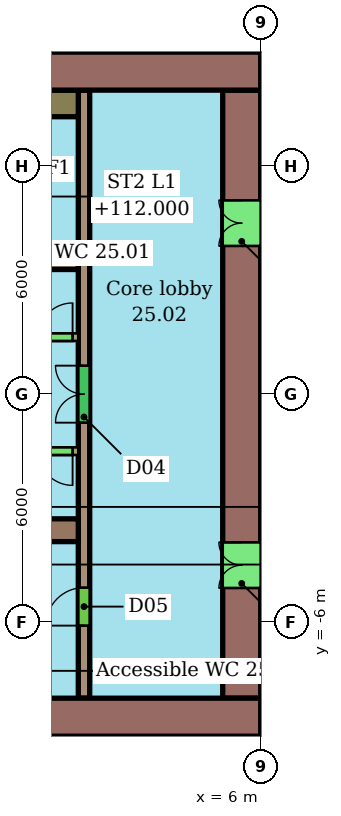
"""IFC4 building model, lengths in metres.
Left out: names, types, materials, properties, quantities, classifications, styles, units other than length and angle.
Written with IfcOpenShell. Run it as: python <this file> out.ifc"""

import sys

from ifc_helpers import new_model, si_unit, direction, frame, frame_2d, origin, place, context, subcontext, project, spatial, rectangle, extrude, element, fill, save


model = new_model("IFC4")
c1 = context("Model", 3, precision=1e-05, world=origin(), true_north=direction((0.0, 1.0)))
c2 = subcontext(c1, "Body", "Model", "MODEL_VIEW")
j1 = project(units=[si_unit("LENGTHUNIT", "METRE"), si_unit("PLANEANGLEUNIT", "RADIAN")], contexts=[c1])
p1 = place(None, origin())
s1 = spatial("IfcSite", under=j1, at=p1, CompositionType="ELEMENT")
p2 = place(p1, origin())
s2 = spatial("IfcBuilding", under=s1, at=p2, CompositionType="ELEMENT")
p3 = place(p2, frame((0.0, 0.0, 110.2)))
s3 = spatial("IfcBuildingStorey", under=s2, at=p3, CompositionType="ELEMENT", Elevation=110.2)
p4 = place(p3, frame((6.0, 8.5, 0.0), z_axis=(0.0, 0.0, 1.0), x_axis=(-1.0, 0.0, 0.0)))
e1 = element("IfcWall", 1, at=p4, inside=s3, PredefinedType="SHEAR", context=c2, shape_type="SweptSolid", body=[
    extrude(rectangle(XDim=12.0, YDim=1.0, at=frame_2d((6.0, 0.0))), origin(), (0.0, 0.0, 1.0), 3.3),
])
p5 = place(p4, frame((5.6, 0.0, 0.0)))
e2 = element("IfcOpeningElement", 2, at=p5, cuts=e1, PredefinedType="OPENING", context=c2, shape_type="SweptSolid", body=[
    extrude(rectangle(XDim=1.2, YDim=2.1, at=frame_2d((0.6, 1.05))), frame((0.0, 0.51, 0.0), z_axis=(0.0, -1.0, 0.0), x_axis=(1.0, 0.0, 0.0)), (0.0, 0.0, 1.0), 1.02),
])
p6 = place(p3, frame((-18.0, -8.5, 0.0), z_axis=(0.0, 0.0, 1.0), x_axis=(1.0, 0.0, 0.0)))
e3 = element("IfcWall", 3, at=p6, inside=s3, PredefinedType="SHEAR", context=c2, shape_type="SweptSolid", body=[
    extrude(rectangle(XDim=24.0, YDim=1.0, at=frame_2d((12.0, 0.0))), origin(), (0.0, 0.0, 1.0), 3.3),
])
p7 = place(p6, frame((6.0, 0.0, 0.0)))
e4 = element("IfcOpeningElement", 4, at=p7, cuts=e3, PredefinedType="OPENING", context=c2, shape_type="SweptSolid", body=[
    extrude(rectangle(XDim=1.2, YDim=2.1, at=frame_2d((0.6, 1.05))), frame((0.0, 0.51, 0.0), z_axis=(0.0, -1.0, 0.0), x_axis=(1.0, 0.0, 0.0)), (0.0, 0.0, 1.0), 1.02),
])
p8 = place(p3, frame((5.5, -8.0, 0.0), z_axis=(0.0, 0.0, 1.0), x_axis=(0.0, 1.0, 0.0)))
e5 = element("IfcWall", 5, at=p8, inside=s3, PredefinedType="SHEAR", context=c2, shape_type="SweptSolid", body=[
    extrude(rectangle(XDim=16.0, YDim=1.0, at=frame_2d((8.0, 0.0))), origin(), (0.0, 0.0, 1.0), 3.3),
])
p9 = place(p8, frame((2.9, 0.0, 0.0)))
e6 = element("IfcOpeningElement", 6, at=p9, cuts=e5, PredefinedType="OPENING", context=c2, shape_type="SweptSolid", body=[
    extrude(rectangle(XDim=1.2, YDim=2.1, at=frame_2d((0.6, 1.05))), frame((0.0, 0.51, 0.0), z_axis=(0.0, -1.0, 0.0), x_axis=(1.0, 0.0, 0.0)), (0.0, 0.0, 1.0), 1.02),
])
p10 = place(p8, frame((11.9, 0.0, 0.0)))
e7 = element("IfcOpeningElement", 7, at=p10, cuts=e5, PredefinedType="OPENING", context=c2, shape_type="SweptSolid", body=[
    extrude(rectangle(XDim=1.2, YDim=2.1, at=frame_2d((0.6, 1.05))), frame((0.0, 0.51, 0.0), z_axis=(0.0, -1.0, 0.0), x_axis=(1.0, 0.0, 0.0)), (0.0, 0.0, 1.0), 1.02),
])
for number, where, z_axis, x_axis in (
    (8, (-6.0, 3.58, 0.0), (0.0, 0.0, 1.0), (1.0, 0.0, 0.0)),
    (9, (-6.0, -3.58, 0.0), (0.0, 0.0, 1.0), (1.0, 0.0, 0.0)),
):
    element("IfcWall", number, at=place(p3, frame(where, z_axis=z_axis, x_axis=x_axis)), inside=s3, PredefinedType="SHEAR", context=c2, shape_type="SweptSolid", body=[
        extrude(rectangle(XDim=7.2, YDim=0.6, at=frame_2d((3.6, 0.0))), origin(), (0.0, 0.0, 1.0), 3.3),
    ])
p11 = place(p3, frame((1.35, -8.0, 0.0), z_axis=(0.0, 0.0, 1.0), x_axis=(0.0, 1.0, 0.0)))
e10 = element("IfcWall", 10, at=p11, inside=s3, PredefinedType="SHEAR", context=c2, shape_type="SweptSolid", body=[
    extrude(rectangle(XDim=16.0, YDim=0.3, at=frame_2d((8.0, 0.0))), origin(), (0.0, 0.0, 1.0), 3.3),
])
p12 = place(p11, frame((1.91, 0.0, 0.0)))
e11 = element("IfcOpeningElement", 11, at=p12, cuts=e10, PredefinedType="OPENING", context=c2, shape_type="SweptSolid", body=[
    extrude(rectangle(XDim=1.0, YDim=2.1, at=frame_2d((0.5, 1.05))), frame((0.0, 0.16, 0.0), z_axis=(0.0, -1.0, 0.0), x_axis=(1.0, 0.0, 0.0)), (0.0, 0.0, 1.0), 0.32),
])
p13 = place(p11, frame((7.25, 0.0, 0.0)))
e12 = element("IfcOpeningElement", 12, at=p13, cuts=e10, PredefinedType="OPENING", context=c2, shape_type="SweptSolid", body=[
    extrude(rectangle(XDim=1.5, YDim=2.1, at=frame_2d((0.75, 1.05))), frame((0.0, 0.16, 0.0), z_axis=(0.0, -1.0, 0.0), x_axis=(1.0, 0.0, 0.0)), (0.0, 0.0, 1.0), 0.32),
])
p14 = place(p3, frame((-13.2, 1.5, 0.0), z_axis=(0.0, 0.0, 1.0), x_axis=(1.0, 0.0, 0.0)))
e13 = element("IfcWall", 13, at=p14, inside=s3, PredefinedType="SHEAR", context=c2, shape_type="SweptSolid", body=[
    extrude(rectangle(XDim=14.4, YDim=0.2, at=frame_2d((7.2, 0.0))), origin(), (0.0, 0.0, 1.0), 3.3),
])
p15 = place(p14, frame((0.546, 0.0, 0.0)))
e14 = element("IfcOpeningElement", 14, at=p15, cuts=e13, PredefinedType="OPENING", context=c2, shape_type="SweptSolid", body=[
    extrude(rectangle(XDim=1.1, YDim=2.1, at=frame_2d((0.55, 1.05))), frame((0.0, 0.11, 0.0), z_axis=(0.0, -1.0, 0.0), x_axis=(1.0, 0.0, 0.0)), (0.0, 0.0, 1.0), 0.22),
])
p16 = place(p14, frame((2.988, 0.0, 0.0)))
e15 = element("IfcOpeningElement", 15, at=p16, cuts=e13, PredefinedType="OPENING", context=c2, shape_type="SweptSolid", body=[
    extrude(rectangle(XDim=1.1, YDim=2.1, at=frame_2d((0.55, 1.05))), frame((0.0, 0.11, 0.0), z_axis=(0.0, -1.0, 0.0), x_axis=(1.0, 0.0, 0.0)), (0.0, 0.0, 1.0), 0.22),
])
p17 = place(p14, frame((5.429, 0.0, 0.0)))
e16 = element("IfcOpeningElement", 16, at=p17, cuts=e13, PredefinedType="OPENING", context=c2, shape_type="SweptSolid", body=[
    extrude(rectangle(XDim=1.1, YDim=2.1, at=frame_2d((0.55, 1.05))), frame((0.0, 0.11, 0.0), z_axis=(0.0, -1.0, 0.0), x_axis=(1.0, 0.0, 0.0)), (0.0, 0.0, 1.0), 0.22),
])
p18 = place(p14, frame((7.871, 0.0, 0.0)))
e17 = element("IfcOpeningElement", 17, at=p18, cuts=e13, PredefinedType="OPENING", context=c2, shape_type="SweptSolid", body=[
    extrude(rectangle(XDim=1.1, YDim=2.1, at=frame_2d((0.55, 1.05))), frame((0.0, 0.11, 0.0), z_axis=(0.0, -1.0, 0.0), x_axis=(1.0, 0.0, 0.0)), (0.0, 0.0, 1.0), 0.22),
])
p19 = place(p14, frame((13.35, 0.0, 0.0)))
e18 = element("IfcOpeningElement", 18, at=p19, cuts=e13, PredefinedType="OPENING", context=c2, shape_type="SweptSolid", body=[
    extrude(rectangle(XDim=0.9, YDim=2.1, at=frame_2d((0.45, 1.05))), frame((0.0, 0.11, 0.0), z_axis=(0.0, -1.0, 0.0), x_axis=(1.0, 0.0, 0.0)), (0.0, 0.0, 1.0), 0.22),
])
p20 = place(p3, frame((1.2, -1.5, 0.0), z_axis=(0.0, 0.0, 1.0), x_axis=(-1.0, 0.0, 0.0)))
e19 = element("IfcWall", 19, at=p20, inside=s3, PredefinedType="SHEAR", context=c2, shape_type="SweptSolid", body=[
    extrude(rectangle(XDim=14.4, YDim=0.2, at=frame_2d((7.2, 0.0))), origin(), (0.0, 0.0, 1.0), 3.3),
])
p21 = place(p20, frame((7.821, 0.0, 0.0)))
e20 = element("IfcOpeningElement", 20, at=p21, cuts=e19, PredefinedType="OPENING", context=c2, shape_type="SweptSolid", body=[
    extrude(rectangle(XDim=1.2, YDim=2.1, at=frame_2d((0.6, 1.05))), frame((0.0, 0.11, 0.0), z_axis=(0.0, -1.0, 0.0), x_axis=(1.0, 0.0, 0.0)), (0.0, 0.0, 1.0), 0.22),
])
p22 = place(p20, frame((0.15, 0.0, 0.0)))
e21 = element("IfcOpeningElement", 21, at=p22, cuts=e19, PredefinedType="OPENING", context=c2, shape_type="SweptSolid", body=[
    extrude(rectangle(XDim=0.9, YDim=2.1, at=frame_2d((0.45, 1.05))), frame((0.0, 0.11, 0.0), z_axis=(0.0, -1.0, 0.0), x_axis=(1.0, 0.0, 0.0)), (0.0, 0.0, 1.0), 0.22),
])
p23 = place(p3, frame((0.4, 7.65, 0.0), z_axis=(0.0, 0.0, 1.0), x_axis=(1.0, 0.0, 0.0)))
e22 = element("IfcWall", 22, at=p23, inside=s3, PredefinedType="SHEAR", context=c2, shape_type="SweptSolid", body=[
    extrude(rectangle(XDim=0.8, YDim=0.7, at=frame_2d((0.4, 0.0))), origin(), (0.0, 0.0, 1.0), 3.3),
])
p24 = place(p9, origin())
e23 = element("IfcDoor", 23, at=p24, inside=s3, OperationType="DOUBLE_DOOR_SINGLE_SWING", PredefinedType="NOTDEFINED", context=c2, shape_type="SweptSolid", body=[
    extrude(rectangle(XDim=1.2, YDim=2.1, at=frame_2d((0.6, 1.05))), frame((0.0, 0.025, 0.0), z_axis=(0.0, -1.0, 0.0), x_axis=(1.0, 0.0, 0.0)), (0.0, 0.0, 1.0), 0.05),
])
fill(e6, e23)
p25 = place(p10, origin())
e24 = element("IfcDoor", 24, at=p25, inside=s3, OperationType="DOUBLE_DOOR_SINGLE_SWING", PredefinedType="NOTDEFINED", context=c2, shape_type="SweptSolid", body=[
    extrude(rectangle(XDim=1.2, YDim=2.1, at=frame_2d((0.6, 1.05))), frame((0.0, 0.025, 0.0), z_axis=(0.0, -1.0, 0.0), x_axis=(1.0, 0.0, 0.0)), (0.0, 0.0, 1.0), 0.05),
])
fill(e7, e24)
p26 = place(p12, origin())
e25 = element("IfcDoor", 25, at=p26, inside=s3, OperationType="SINGLE_SWING_LEFT", PredefinedType="NOTDEFINED", context=c2, shape_type="SweptSolid", body=[
    extrude(rectangle(XDim=1.0, YDim=2.1, at=frame_2d((0.5, 1.05))), frame((0.0, 0.025, 0.0), z_axis=(0.0, -1.0, 0.0), x_axis=(1.0, 0.0, 0.0)), (0.0, 0.0, 1.0), 0.05),
])
fill(e11, e25)
p27 = place(p13, origin())
e26 = element("IfcDoor", 26, at=p27, inside=s3, OperationType="DOUBLE_DOOR_SINGLE_SWING", PredefinedType="NOTDEFINED", context=c2, shape_type="SweptSolid", body=[
    extrude(rectangle(XDim=1.5, YDim=2.1, at=frame_2d((0.75, 1.05))), frame((0.0, 0.025, 0.0), z_axis=(0.0, -1.0, 0.0), x_axis=(1.0, 0.0, 0.0)), (0.0, 0.0, 1.0), 0.05),
])
fill(e12, e26)
p28 = place(p19, origin())
e27 = element("IfcDoor", 27, at=p28, inside=s3, OperationType="SINGLE_SWING_RIGHT", PredefinedType="NOTDEFINED", context=c2, shape_type="SweptSolid", body=[
    extrude(rectangle(XDim=0.9, YDim=2.1, at=frame_2d((0.45, 1.05))), frame((0.0, 0.025, 0.0), z_axis=(0.0, -1.0, 0.0), x_axis=(1.0, 0.0, 0.0)), (0.0, 0.0, 1.0), 0.05),
])
fill(e18, e27)
p29 = place(p22, origin())
e28 = element("IfcDoor", 28, at=p29, inside=s3, OperationType="SINGLE_SWING_LEFT", PredefinedType="NOTDEFINED", context=c2, shape_type="SweptSolid", body=[
    extrude(rectangle(XDim=0.9, YDim=2.1, at=frame_2d((0.45, 1.05))), frame((0.0, 0.025, 0.0), z_axis=(0.0, -1.0, 0.0), x_axis=(1.0, 0.0, 0.0)), (0.0, 0.0, 1.0), 0.05),
])
fill(e21, e28)
save(model, sys.argv[1])
